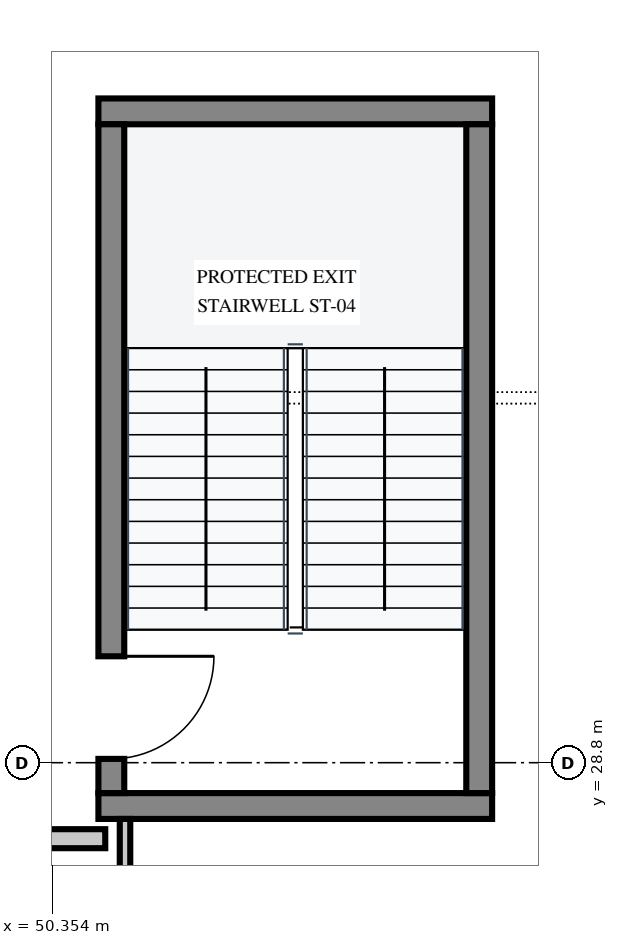
"""IFC4 building model, lengths in metres.
Left out: names, types, materials, properties, quantities, classifications, styles, units other than length and angle.
Written with IfcOpenShell. Run it as: python <this file> out.ifc"""

import sys

from ifc_helpers import new_model, si_unit, direction, frame, frame_2d, origin, place, context, subcontext, project, spatial, rectangle, extrude, element, fill, save


model = new_model("IFC4")
c1 = context("Model", 3, precision=1e-05, world=origin(), true_north=direction((0.0, 1.0)))
c2 = subcontext(c1, "Body", "Model", "MODEL_VIEW")
j1 = project(units=[si_unit("LENGTHUNIT", "METRE"), si_unit("PLANEANGLEUNIT", "RADIAN")], contexts=[c1])
p1 = place(None, origin())
s1 = spatial("IfcSite", under=j1, at=p1, CompositionType="ELEMENT")
p2 = place(p1, origin())
s2 = spatial("IfcBuilding", under=s1, at=p2, CompositionType="ELEMENT")
p3 = place(p2, frame((0.0, 0.0, 15.0)))
s3 = spatial("IfcBuildingStorey", under=s2, at=p3, CompositionType="ELEMENT", Elevation=15.0)
for number, where, z_axis, x_axis in (
    (1, (50.96, 28.23, 0.0), (0.0, 0.0, 1.0), (1.0, 0.0, 0.0)),
    (2, (50.96, 37.37, 0.0), (0.0, 0.0, 1.0), (1.0, 0.0, 0.0)),
):
    element("IfcWall", number, at=place(p3, frame(where, z_axis=z_axis, x_axis=x_axis)), inside=s3, PredefinedType="SHEAR", context=c2, shape_type="SweptSolid", body=[
        extrude(rectangle(XDim=5.18, YDim=0.34, at=frame_2d((2.59, 0.0))), origin(), (0.0, 0.0, 1.0), 4.52),
    ])
p4 = place(p3, frame((55.97, 28.4, 0.0), z_axis=(0.0, 0.0, 1.0), x_axis=(0.0, 1.0, 0.0)))
e3 = element("IfcWall", 3, at=p4, inside=s3, PredefinedType="SHEAR", context=c2, shape_type="SweptSolid", body=[
    extrude(rectangle(XDim=8.8, YDim=0.34, at=frame_2d((4.4, 0.0))), origin(), (0.0, 0.0, 1.0), 4.52),
])
p5 = place(p3, frame((51.13, 28.4, 0.0), z_axis=(0.0, 0.0, 1.0), x_axis=(0.0, 1.0, 0.0)))
e4 = element("IfcWall", 4, at=p5, inside=s3, PredefinedType="SHEAR", context=c2, shape_type="SweptSolid", body=[
    extrude(rectangle(XDim=8.8, YDim=0.34, at=frame_2d((4.4, 0.0))), origin(), (0.0, 0.0, 1.0), 4.52),
])
p6 = place(p5, frame((0.45, 0.0, 0.0)))
e5 = element("IfcOpeningElement", 5, at=p6, cuts=e4, PredefinedType="OPENING", context=c2, shape_type="SweptSolid", body=[
    extrude(rectangle(XDim=1.35, YDim=2.2, at=frame_2d((0.675, 1.1))), frame((0.0, 0.182, 0.0), z_axis=(0.0, -1.0, 0.0), x_axis=(1.0, 0.0, 0.0)), (0.0, 0.0, 1.0), 0.364),
])
p7 = place(p3, frame((48.2, 27.8, 0.0), z_axis=(0.0, 0.0, 1.0), x_axis=(1.0, 0.0, 0.0)))
e6 = element("IfcWall", 6, at=p7, inside=s3, PredefinedType="PARTITIONING", context=c2, shape_type="SweptSolid", body=[
    extrude(rectangle(XDim=2.85, YDim=0.25, at=frame_2d((1.425, 0.0))), origin(), (0.0, 0.0, 1.0), 3.46),
])
p8 = place(p3, frame((51.31, 23.745, 0.0), z_axis=(0.0, 0.0, 1.0), x_axis=(0.0, 1.0, 0.0)))
e7 = element("IfcWall", 7, at=p8, inside=s3, PredefinedType="PARTITIONING", context=c2, shape_type="SweptSolid", body=[
    extrude(rectangle(XDim=4.315, YDim=0.138, at=frame_2d((2.158, 0.0))), origin(), (0.0, 0.0, 1.0), 4.52),
])
p9 = place(p6, frame((1.35, 0.0, 0.0), z_axis=(0.0, 0.0, 1.0), x_axis=(-1.0, 0.0, 0.0)))
e8 = element("IfcDoor", 8, at=p9, inside=s3, OperationType="SINGLE_SWING_LEFT", PredefinedType="DOOR", context=c2, shape_type="SweptSolid", body=[
    extrude(rectangle(XDim=1.35, YDim=2.2, at=frame_2d((0.675, 1.1))), frame((0.0, 0.025, 0.0), z_axis=(0.0, -1.0, 0.0), x_axis=(1.0, 0.0, 0.0)), (0.0, 0.0, 1.0), 0.05),
])
fill(e5, e8)
save(model, sys.argv[1])
